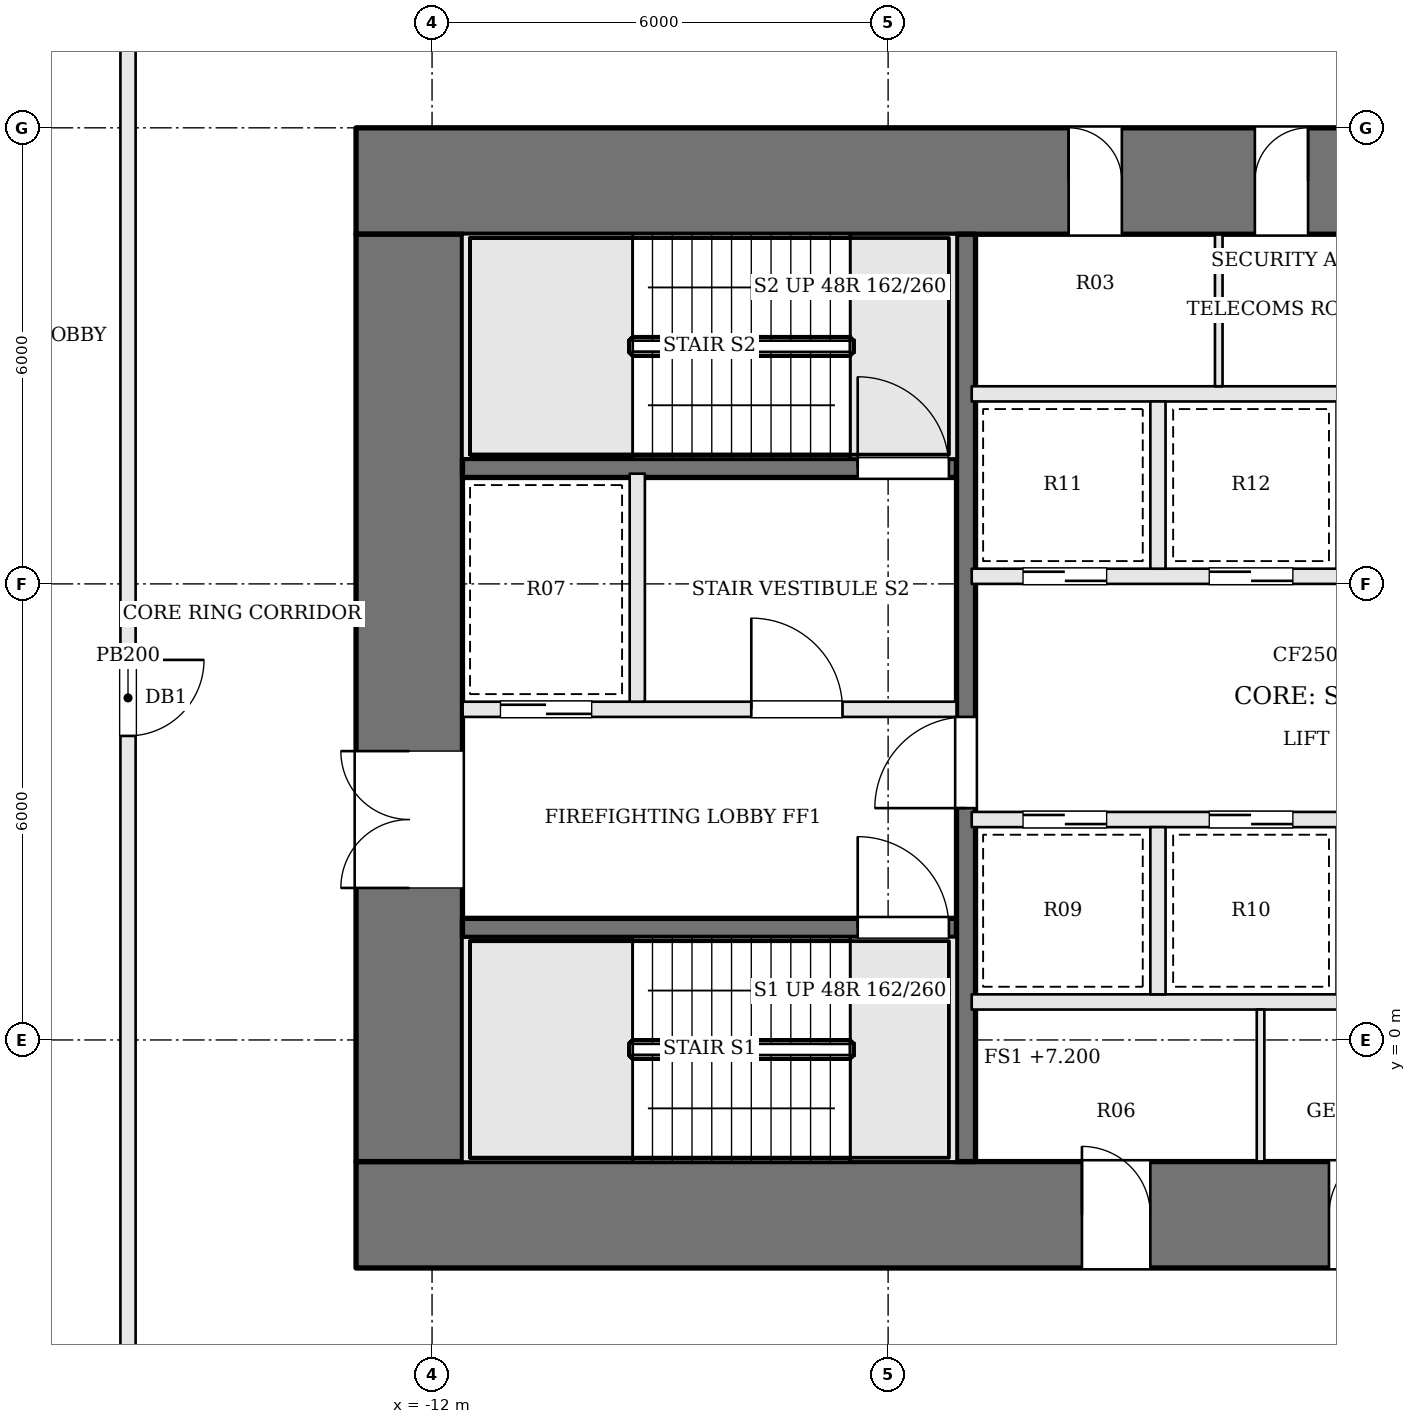
"""IFC4 building model, lengths in metres.
Left out: names, types, materials, properties, quantities, classifications, styles, units other than length and angle.
Written with IfcOpenShell. Run it as: python <this file> out.ifc"""

import sys

from ifc_helpers import new_model, si_unit, direction, frame, frame_2d, origin, place, context, subcontext, project, spatial, rectangle, extrude, element, fill, save


model = new_model("IFC4")
c1 = context("Model", 3, precision=1e-05, world=origin(), true_north=direction((0.0, 1.0)))
c2 = subcontext(c1, "Body", "Model", "MODEL_VIEW")
j1 = project(units=[si_unit("LENGTHUNIT", "METRE"), si_unit("PLANEANGLEUNIT", "RADIAN")], contexts=[c1])
p1 = place(None, origin())
s1 = spatial("IfcSite", under=j1, at=p1, CompositionType="ELEMENT")
p2 = place(p1, origin())
s2 = spatial("IfcBuilding", under=s1, at=p2, CompositionType="ELEMENT")
p3 = place(p2, frame((0.0, 0.0, 7.2)))
s3 = spatial("IfcBuildingStorey", under=s2, at=p3, CompositionType="ELEMENT", Elevation=7.2)
p4 = place(p3, frame((-13.0, 11.3, 0.0), z_axis=(0.0, 0.0, 1.0), x_axis=(1.0, 0.0, 0.0)))
e1 = element("IfcWall", 1, at=p4, inside=s3, PredefinedType="SHEAR", context=c2, shape_type="SweptSolid", body=[
    extrude(rectangle(XDim=26.0, YDim=1.4, at=frame_2d((13.0, 0.0))), origin(), (0.0, 0.0, 1.0), 7.8),
])
p5 = place(p4, frame((9.375, 0.0, 0.0)))
e2 = element("IfcOpeningElement", 2, at=p5, cuts=e1, PredefinedType="OPENING", context=c2, shape_type="SweptSolid", body=[
    extrude(rectangle(XDim=0.7, YDim=2.1, at=frame_2d((0.35, 1.05))), frame((0.0, 0.71, 0.0), z_axis=(0.0, -1.0, 0.0), x_axis=(1.0, 0.0, 0.0)), (0.0, 0.0, 1.0), 1.42),
])
p6 = place(p4, frame((11.825, 0.0, 0.0)))
e3 = element("IfcOpeningElement", 3, at=p6, cuts=e1, PredefinedType="OPENING", context=c2, shape_type="SweptSolid", body=[
    extrude(rectangle(XDim=0.7, YDim=2.1, at=frame_2d((0.35, 1.05))), frame((0.0, 0.71, 0.0), z_axis=(0.0, -1.0, 0.0), x_axis=(1.0, 0.0, 0.0)), (0.0, 0.0, 1.0), 1.42),
])
p7 = place(p4, frame((13.725, 0.0, 0.0)))
e4 = element("IfcOpeningElement", 4, at=p7, cuts=e1, PredefinedType="OPENING", context=c2, shape_type="SweptSolid", body=[
    extrude(rectangle(XDim=1.0, YDim=2.1, at=frame_2d((0.5, 1.05))), frame((0.0, 0.71, 0.0), z_axis=(0.0, -1.0, 0.0), x_axis=(1.0, 0.0, 0.0)), (0.0, 0.0, 1.0), 1.42),
])
p8 = place(p4, frame((16.175, 0.0, 0.0)))
e5 = element("IfcOpeningElement", 5, at=p8, cuts=e1, PredefinedType="OPENING", context=c2, shape_type="SweptSolid", body=[
    extrude(rectangle(XDim=1.0, YDim=2.1, at=frame_2d((0.5, 1.05))), frame((0.0, 0.71, 0.0), z_axis=(0.0, -1.0, 0.0), x_axis=(1.0, 0.0, 0.0)), (0.0, 0.0, 1.0), 1.42),
])
p9 = place(p3, frame((-13.0, -2.3, 0.0), z_axis=(0.0, 0.0, 1.0), x_axis=(1.0, 0.0, 0.0)))
e6 = element("IfcWall", 6, at=p9, inside=s3, PredefinedType="SHEAR", context=c2, shape_type="SweptSolid", body=[
    extrude(rectangle(XDim=26.0, YDim=1.4, at=frame_2d((13.0, 0.0))), origin(), (0.0, 0.0, 1.0), 7.8),
])
p10 = place(p9, frame((9.55, 0.0, 0.0)))
e7 = element("IfcOpeningElement", 7, at=p10, cuts=e6, PredefinedType="OPENING", context=c2, shape_type="SweptSolid", body=[
    extrude(rectangle(XDim=0.9, YDim=2.1, at=frame_2d((0.45, 1.05))), frame((0.0, 0.71, 0.0), z_axis=(0.0, -1.0, 0.0), x_axis=(1.0, 0.0, 0.0)), (0.0, 0.0, 1.0), 1.42),
])
p11 = place(p9, frame((12.8, 0.0, 0.0)))
e8 = element("IfcOpeningElement", 8, at=p11, cuts=e6, PredefinedType="OPENING", context=c2, shape_type="SweptSolid", body=[
    extrude(rectangle(XDim=0.9, YDim=2.1, at=frame_2d((0.45, 1.05))), frame((0.0, 0.71, 0.0), z_axis=(0.0, -1.0, 0.0), x_axis=(1.0, 0.0, 0.0)), (0.0, 0.0, 1.0), 1.42),
])
p12 = place(p9, frame((15.0, 0.0, 0.0)))
e9 = element("IfcOpeningElement", 9, at=p12, cuts=e6, PredefinedType="OPENING", context=c2, shape_type="SweptSolid", body=[
    extrude(rectangle(XDim=1.0, YDim=2.1, at=frame_2d((0.5, 1.05))), frame((0.0, 0.71, 0.0), z_axis=(0.0, -1.0, 0.0), x_axis=(1.0, 0.0, 0.0)), (0.0, 0.0, 1.0), 1.42),
])
p13 = place(p9, frame((16.7, 0.0, 0.0)))
e10 = element("IfcOpeningElement", 10, at=p13, cuts=e6, PredefinedType="OPENING", context=c2, shape_type="SweptSolid", body=[
    extrude(rectangle(XDim=0.9, YDim=2.1, at=frame_2d((0.45, 1.05))), frame((0.0, 0.71, 0.0), z_axis=(0.0, -1.0, 0.0), x_axis=(1.0, 0.0, 0.0)), (0.0, 0.0, 1.0), 1.42),
])
p14 = place(p3, frame((-12.3, -1.6, 0.0), z_axis=(0.0, 0.0, 1.0), x_axis=(0.0, 1.0, 0.0)))
e11 = element("IfcWall", 11, at=p14, inside=s3, PredefinedType="SHEAR", context=c2, shape_type="SweptSolid", body=[
    extrude(rectangle(XDim=12.2, YDim=1.4, at=frame_2d((6.1, 0.0))), origin(), (0.0, 0.0, 1.0), 7.8),
])
p15 = place(p14, frame((3.6, 0.0, 0.0)))
e12 = element("IfcOpeningElement", 12, at=p15, cuts=e11, PredefinedType="OPENING", context=c2, shape_type="SweptSolid", body=[
    extrude(rectangle(XDim=1.8, YDim=2.1, at=frame_2d((0.9, 1.05))), frame((0.0, 0.71, 0.0), z_axis=(0.0, -1.0, 0.0), x_axis=(1.0, 0.0, 0.0)), (0.0, 0.0, 1.0), 1.42),
])
p16 = place(p3, frame((-11.6, 1.475, 0.0), z_axis=(0.0, 0.0, 1.0), x_axis=(1.0, 0.0, 0.0)))
e13 = element("IfcWall", 13, at=p16, inside=s3, PredefinedType="SOLIDWALL", context=c2, shape_type="SweptSolid", body=[
    extrude(rectangle(XDim=6.5, YDim=0.25, at=frame_2d((3.25, 0.0))), origin(), (0.0, 0.0, 1.0), 7.55),
])
p17 = place(p16, frame((5.2, 0.0, 0.0)))
e14 = element("IfcOpeningElement", 14, at=p17, cuts=e13, PredefinedType="OPENING", context=c2, shape_type="SweptSolid", body=[
    extrude(rectangle(XDim=1.2, YDim=2.1, at=frame_2d((0.6, 1.05))), frame((0.0, 0.135, 0.0), z_axis=(0.0, -1.0, 0.0), x_axis=(1.0, 0.0, 0.0)), (0.0, 0.0, 1.0), 0.27),
])
p18 = place(p3, frame((-11.6, 4.35, 0.0), z_axis=(0.0, 0.0, 1.0), x_axis=(1.0, 0.0, 0.0)))
e15 = element("IfcWall", 15, at=p18, inside=s3, PredefinedType="SOLIDWALL", context=c2, shape_type="SweptSolid", body=[
    extrude(rectangle(XDim=6.5, YDim=0.2, at=frame_2d((3.25, 0.0))), origin(), (0.0, 0.0, 1.0), 7.55),
])
p19 = place(p18, frame((3.8, 0.0, 0.0)))
e16 = element("IfcOpeningElement", 16, at=p19, cuts=e15, PredefinedType="OPENING", context=c2, shape_type="SweptSolid", body=[
    extrude(rectangle(XDim=1.2, YDim=2.1, at=frame_2d((0.6, 1.05))), frame((0.0, 0.11, 0.0), z_axis=(0.0, -1.0, 0.0), x_axis=(1.0, 0.0, 0.0)), (0.0, 0.0, 1.0), 0.22),
])
p20 = place(p18, frame((0.5, 0.0, 0.0)))
e17 = element("IfcOpeningElement", 17, at=p20, cuts=e15, PredefinedType="OPENING", context=c2, shape_type="SweptSolid", body=[
    extrude(rectangle(XDim=1.2, YDim=2.1, at=frame_2d((0.6, 1.05))), frame((0.0, 0.11, 0.0), z_axis=(0.0, -1.0, 0.0), x_axis=(1.0, 0.0, 0.0)), (0.0, 0.0, 1.0), 0.22),
])
p21 = place(p3, frame((-11.6, 7.525, 0.0), z_axis=(0.0, 0.0, 1.0), x_axis=(1.0, 0.0, 0.0)))
e18 = element("IfcWall", 18, at=p21, inside=s3, PredefinedType="SOLIDWALL", context=c2, shape_type="SweptSolid", body=[
    extrude(rectangle(XDim=6.5, YDim=0.25, at=frame_2d((3.25, 0.0))), origin(), (0.0, 0.0, 1.0), 7.55),
])
p22 = place(p21, frame((5.2, 0.0, 0.0)))
e19 = element("IfcOpeningElement", 19, at=p22, cuts=e18, PredefinedType="OPENING", context=c2, shape_type="SweptSolid", body=[
    extrude(rectangle(XDim=1.2, YDim=2.1, at=frame_2d((0.6, 1.05))), frame((0.0, 0.135, 0.0), z_axis=(0.0, -1.0, 0.0), x_axis=(1.0, 0.0, 0.0)), (0.0, 0.0, 1.0), 0.27),
])
p23 = place(p3, frame((-9.3, 4.45, 0.0), z_axis=(0.0, 0.0, 1.0), x_axis=(0.0, 1.0, 0.0)))
e20 = element("IfcWall", 20, at=p23, inside=s3, PredefinedType="SOLIDWALL", context=c2, shape_type="SweptSolid", body=[
    extrude(rectangle(XDim=3.0, YDim=0.2, at=frame_2d((1.5, 0.0))), origin(), (0.0, 0.0, 1.0), 7.55),
])
p24 = place(p3, frame((-4.975, -1.6, 0.0), z_axis=(0.0, 0.0, 1.0), x_axis=(0.0, 1.0, 0.0)))
e21 = element("IfcWall", 21, at=p24, inside=s3, PredefinedType="SOLIDWALL", context=c2, shape_type="SweptSolid", body=[
    extrude(rectangle(XDim=12.2, YDim=0.25, at=frame_2d((6.1, 0.0))), origin(), (0.0, 0.0, 1.0), 7.55),
])
p25 = place(p24, frame((4.65, 0.0, 0.0)))
e22 = element("IfcOpeningElement", 22, at=p25, cuts=e21, PredefinedType="OPENING", context=c2, shape_type="SweptSolid", body=[
    extrude(rectangle(XDim=1.2, YDim=2.1, at=frame_2d((0.6, 1.05))), frame((0.0, 0.135, 0.0), z_axis=(0.0, -1.0, 0.0), x_axis=(1.0, 0.0, 0.0)), (0.0, 0.0, 1.0), 0.27),
])
p26 = place(p3, frame((-4.9, 0.5, 0.0), z_axis=(0.0, 0.0, 1.0), x_axis=(1.0, 0.0, 0.0)))
e23 = element("IfcWall", 23, at=p26, inside=s3, PredefinedType="SOLIDWALL", context=c2, shape_type="SweptSolid", body=[
    extrude(rectangle(XDim=9.8, YDim=0.2, at=frame_2d((4.9, 0.0))), origin(), (0.0, 0.0, 1.0), 7.55),
])
p27 = place(p3, frame((-4.9, 2.9, 0.0), z_axis=(0.0, 0.0, 1.0), x_axis=(1.0, 0.0, 0.0)))
e24 = element("IfcWall", 24, at=p27, inside=s3, PredefinedType="SOLIDWALL", context=c2, shape_type="SweptSolid", body=[
    extrude(rectangle(XDim=9.8, YDim=0.2, at=frame_2d((4.9, 0.0))), origin(), (0.0, 0.0, 1.0), 7.55),
])
p28 = place(p27, frame((0.675, 0.0, 0.0)))
e25 = element("IfcOpeningElement", 25, at=p28, cuts=e24, PredefinedType="OPENING", context=c2, shape_type="SweptSolid", body=[
    extrude(rectangle(XDim=1.1, YDim=2.1, at=frame_2d((0.55, 1.05))), frame((0.0, 0.11, 0.0), z_axis=(0.0, -1.0, 0.0), x_axis=(1.0, 0.0, 0.0)), (0.0, 0.0, 1.0), 0.22),
])
p29 = place(p27, frame((3.125, 0.0, 0.0)))
e26 = element("IfcOpeningElement", 26, at=p29, cuts=e24, PredefinedType="OPENING", context=c2, shape_type="SweptSolid", body=[
    extrude(rectangle(XDim=1.1, YDim=2.1, at=frame_2d((0.55, 1.05))), frame((0.0, 0.11, 0.0), z_axis=(0.0, -1.0, 0.0), x_axis=(1.0, 0.0, 0.0)), (0.0, 0.0, 1.0), 0.22),
])
p30 = place(p3, frame((-4.9, 6.1, 0.0), z_axis=(0.0, 0.0, 1.0), x_axis=(1.0, 0.0, 0.0)))
e27 = element("IfcWall", 27, at=p30, inside=s3, PredefinedType="SOLIDWALL", context=c2, shape_type="SweptSolid", body=[
    extrude(rectangle(XDim=9.8, YDim=0.2, at=frame_2d((4.9, 0.0))), origin(), (0.0, 0.0, 1.0), 7.55),
])
p31 = place(p30, frame((0.675, 0.0, 0.0)))
e28 = element("IfcOpeningElement", 28, at=p31, cuts=e27, PredefinedType="OPENING", context=c2, shape_type="SweptSolid", body=[
    extrude(rectangle(XDim=1.1, YDim=2.1, at=frame_2d((0.55, 1.05))), frame((0.0, 0.11, 0.0), z_axis=(0.0, -1.0, 0.0), x_axis=(1.0, 0.0, 0.0)), (0.0, 0.0, 1.0), 0.22),
])
p32 = place(p30, frame((3.125, 0.0, 0.0)))
e29 = element("IfcOpeningElement", 29, at=p32, cuts=e27, PredefinedType="OPENING", context=c2, shape_type="SweptSolid", body=[
    extrude(rectangle(XDim=1.1, YDim=2.1, at=frame_2d((0.55, 1.05))), frame((0.0, 0.11, 0.0), z_axis=(0.0, -1.0, 0.0), x_axis=(1.0, 0.0, 0.0)), (0.0, 0.0, 1.0), 0.22),
])
p33 = place(p30, frame((5.575, 0.0, 0.0)))
e30 = element("IfcOpeningElement", 30, at=p33, cuts=e27, PredefinedType="OPENING", context=c2, shape_type="SweptSolid", body=[
    extrude(rectangle(XDim=1.1, YDim=2.1, at=frame_2d((0.55, 1.05))), frame((0.0, 0.11, 0.0), z_axis=(0.0, -1.0, 0.0), x_axis=(1.0, 0.0, 0.0)), (0.0, 0.0, 1.0), 0.22),
])
p34 = place(p30, frame((8.025, 0.0, 0.0)))
e31 = element("IfcOpeningElement", 31, at=p34, cuts=e27, PredefinedType="OPENING", context=c2, shape_type="SweptSolid", body=[
    extrude(rectangle(XDim=1.1, YDim=2.1, at=frame_2d((0.55, 1.05))), frame((0.0, 0.11, 0.0), z_axis=(0.0, -1.0, 0.0), x_axis=(1.0, 0.0, 0.0)), (0.0, 0.0, 1.0), 0.22),
])
p35 = place(p3, frame((-4.9, 8.5, 0.0), z_axis=(0.0, 0.0, 1.0), x_axis=(1.0, 0.0, 0.0)))
e32 = element("IfcWall", 32, at=p35, inside=s3, PredefinedType="SOLIDWALL", context=c2, shape_type="SweptSolid", body=[
    extrude(rectangle(XDim=9.8, YDim=0.2, at=frame_2d((4.9, 0.0))), origin(), (0.0, 0.0, 1.0), 7.55),
])
for number, where, z_axis, x_axis in (
    (33, (-2.45, 0.6, 0.0), (0.0, 0.0, 1.0), (0.0, 1.0, 0.0)),
    (34, (-2.45, 6.2, 0.0), (0.0, 0.0, 1.0), (0.0, 1.0, 0.0)),
):
    element("IfcWall", number, at=place(p3, frame(where, z_axis=z_axis, x_axis=x_axis)), inside=s3, PredefinedType="SOLIDWALL", context=c2, shape_type="SweptSolid", body=[
        extrude(rectangle(XDim=2.2, YDim=0.2, at=frame_2d((1.1, 0.0))), origin(), (0.0, 0.0, 1.0), 7.55),
    ])
for number, where, z_axis, x_axis in (
    (35, (-1.1, -1.6, 0.0), (0.0, 0.0, 1.0), (0.0, 1.0, 0.0)),
    (36, (-1.65, 8.6, 0.0), (0.0, 0.0, 1.0), (0.0, 1.0, 0.0)),
):
    element("IfcWall", number, at=place(p3, frame(where, z_axis=z_axis, x_axis=x_axis)), inside=s3, PredefinedType="PARTITIONING", context=c2, shape_type="SweptSolid", body=[
        extrude(rectangle(XDim=2.0, YDim=0.1, at=frame_2d((1.0, 0.0))), origin(), (0.0, 0.0, 1.0), 7.55),
    ])
p36 = place(p3, frame((-16.0, 14.9, 0.0), z_axis=(0.0, 0.0, 1.0), x_axis=(0.0, -1.0, 0.0)))
e37 = element("IfcWall", 37, at=p36, inside=s3, PredefinedType="PARTITIONING", context=c2, shape_type="SweptSolid", body=[
    extrude(rectangle(XDim=20.8, YDim=0.2, at=frame_2d((10.4, 0.0))), origin(), (0.0, 0.0, 1.0), 6.83),
])
p37 = place(p36, frame((9.9, 0.0, 0.0)))
e38 = element("IfcOpeningElement", 38, at=p37, cuts=e37, PredefinedType="OPENING", context=c2, shape_type="SweptSolid", body=[
    extrude(rectangle(XDim=1.0, YDim=2.1, at=frame_2d((0.5, 1.05))), frame((0.0, 0.11, 0.0), z_axis=(0.0, -1.0, 0.0), x_axis=(1.0, 0.0, 0.0)), (0.0, 0.0, 1.0), 0.22),
])
p38 = place(p15, origin())
e39 = element("IfcDoor", 39, at=p38, inside=s3, OperationType="DOUBLE_DOOR_SINGLE_SWING", PredefinedType="DOOR", context=c2, shape_type="SweptSolid", body=[
    extrude(rectangle(XDim=1.8, YDim=2.1, at=frame_2d((0.9, 1.05))), frame((0.0, 0.025, 0.0), z_axis=(0.0, -1.0, 0.0), x_axis=(1.0, 0.0, 0.0)), (0.0, 0.0, 1.0), 0.05),
])
fill(e12, e39)
p39 = place(p25, origin())
e40 = element("IfcDoor", 40, at=p39, inside=s3, OperationType="SINGLE_SWING_LEFT", PredefinedType="DOOR", context=c2, shape_type="SweptSolid", body=[
    extrude(rectangle(XDim=1.2, YDim=2.1, at=frame_2d((0.6, 1.05))), frame((0.0, 0.025, 0.0), z_axis=(0.0, -1.0, 0.0), x_axis=(1.0, 0.0, 0.0)), (0.0, 0.0, 1.0), 0.05),
])
fill(e22, e40)
p40 = place(p19, origin())
e41 = element("IfcDoor", 41, at=p40, inside=s3, OperationType="SINGLE_SWING_LEFT", PredefinedType="DOOR", context=c2, shape_type="SweptSolid", body=[
    extrude(rectangle(XDim=1.2, YDim=2.1, at=frame_2d((0.6, 1.05))), frame((0.0, 0.025, 0.0), z_axis=(0.0, -1.0, 0.0), x_axis=(1.0, 0.0, 0.0)), (0.0, 0.0, 1.0), 0.05),
])
fill(e16, e41)
p41 = place(p17, origin())
e42 = element("IfcDoor", 42, at=p41, inside=s3, OperationType="SINGLE_SWING_LEFT", PredefinedType="DOOR", context=c2, shape_type="SweptSolid", body=[
    extrude(rectangle(XDim=1.2, YDim=2.1, at=frame_2d((0.6, 1.05))), frame((0.0, 0.025, 0.0), z_axis=(0.0, -1.0, 0.0), x_axis=(1.0, 0.0, 0.0)), (0.0, 0.0, 1.0), 0.05),
])
fill(e14, e42)
p42 = place(p22, origin())
e43 = element("IfcDoor", 43, at=p42, inside=s3, OperationType="SINGLE_SWING_LEFT", PredefinedType="DOOR", context=c2, shape_type="SweptSolid", body=[
    extrude(rectangle(XDim=1.2, YDim=2.1, at=frame_2d((0.6, 1.05))), frame((0.0, 0.025, 0.0), z_axis=(0.0, -1.0, 0.0), x_axis=(1.0, 0.0, 0.0)), (0.0, 0.0, 1.0), 0.05),
])
fill(e19, e43)
p43 = place(p20, origin())
e44 = element("IfcDoor", 44, at=p43, inside=s3, OperationType="SLIDING_TO_RIGHT", PredefinedType="DOOR", context=c2, shape_type="SweptSolid", body=[
    extrude(rectangle(XDim=1.2, YDim=2.1, at=frame_2d((0.6, 1.05))), frame((0.0, 0.025, 0.0), z_axis=(0.0, -1.0, 0.0), x_axis=(1.0, 0.0, 0.0)), (0.0, 0.0, 1.0), 0.05),
])
fill(e17, e44)
p44 = place(p28, origin())
e45 = element("IfcDoor", 45, at=p44, inside=s3, OperationType="SLIDING_TO_RIGHT", PredefinedType="DOOR", context=c2, shape_type="SweptSolid", body=[
    extrude(rectangle(XDim=1.1, YDim=2.1, at=frame_2d((0.55, 1.05))), frame((0.0, 0.025, 0.0), z_axis=(0.0, -1.0, 0.0), x_axis=(1.0, 0.0, 0.0)), (0.0, 0.0, 1.0), 0.05),
])
fill(e25, e45)
p45 = place(p29, origin())
e46 = element("IfcDoor", 46, at=p45, inside=s3, OperationType="SLIDING_TO_LEFT", PredefinedType="DOOR", context=c2, shape_type="SweptSolid", body=[
    extrude(rectangle(XDim=1.1, YDim=2.1, at=frame_2d((0.55, 1.05))), frame((0.0, 0.025, 0.0), z_axis=(0.0, -1.0, 0.0), x_axis=(1.0, 0.0, 0.0)), (0.0, 0.0, 1.0), 0.05),
])
fill(e26, e46)
p46 = place(p31, origin())
e47 = element("IfcDoor", 47, at=p46, inside=s3, OperationType="SLIDING_TO_RIGHT", PredefinedType="DOOR", context=c2, shape_type="SweptSolid", body=[
    extrude(rectangle(XDim=1.1, YDim=2.1, at=frame_2d((0.55, 1.05))), frame((0.0, 0.025, 0.0), z_axis=(0.0, -1.0, 0.0), x_axis=(1.0, 0.0, 0.0)), (0.0, 0.0, 1.0), 0.05),
])
fill(e28, e47)
p47 = place(p32, origin())
e48 = element("IfcDoor", 48, at=p47, inside=s3, OperationType="SLIDING_TO_LEFT", PredefinedType="DOOR", context=c2, shape_type="SweptSolid", body=[
    extrude(rectangle(XDim=1.1, YDim=2.1, at=frame_2d((0.55, 1.05))), frame((0.0, 0.025, 0.0), z_axis=(0.0, -1.0, 0.0), x_axis=(1.0, 0.0, 0.0)), (0.0, 0.0, 1.0), 0.05),
])
fill(e29, e48)
p48 = place(p10, origin())
e49 = element("IfcDoor", 49, at=p48, inside=s3, OperationType="SINGLE_SWING_LEFT", PredefinedType="DOOR", context=c2, shape_type="SweptSolid", body=[
    extrude(rectangle(XDim=0.9, YDim=2.1, at=frame_2d((0.45, 1.05))), frame((0.0, 0.025, 0.0), z_axis=(0.0, -1.0, 0.0), x_axis=(1.0, 0.0, 0.0)), (0.0, 0.0, 1.0), 0.05),
])
fill(e7, e49)
p49 = place(p11, origin())
e50 = element("IfcDoor", 50, at=p49, inside=s3, OperationType="SINGLE_SWING_RIGHT", PredefinedType="DOOR", context=c2, shape_type="SweptSolid", body=[
    extrude(rectangle(XDim=0.9, YDim=2.1, at=frame_2d((0.45, 1.05))), frame((0.0, 0.025, 0.0), z_axis=(0.0, -1.0, 0.0), x_axis=(1.0, 0.0, 0.0)), (0.0, 0.0, 1.0), 0.05),
])
fill(e8, e50)
p50 = place(p5, origin())
e51 = element("IfcDoor", 51, at=p50, inside=s3, OperationType="SINGLE_SWING_LEFT", PredefinedType="DOOR", context=c2, shape_type="SweptSolid", body=[
    extrude(rectangle(XDim=0.7, YDim=2.1, at=frame_2d((0.35, 1.05))), frame((0.0, 0.025, 0.0), z_axis=(0.0, -1.0, 0.0), x_axis=(1.0, 0.0, 0.0)), (0.0, 0.0, 1.0), 0.05),
])
fill(e2, e51)
p51 = place(p6, origin())
e52 = element("IfcDoor", 52, at=p51, inside=s3, OperationType="SINGLE_SWING_RIGHT", PredefinedType="DOOR", context=c2, shape_type="SweptSolid", body=[
    extrude(rectangle(XDim=0.7, YDim=2.1, at=frame_2d((0.35, 1.05))), frame((0.0, 0.025, 0.0), z_axis=(0.0, -1.0, 0.0), x_axis=(1.0, 0.0, 0.0)), (0.0, 0.0, 1.0), 0.05),
])
fill(e3, e52)
p52 = place(p37, origin())
e53 = element("IfcDoor", 53, at=p52, inside=s3, OperationType="SINGLE_SWING_LEFT", PredefinedType="DOOR", context=c2, shape_type="SweptSolid", body=[
    extrude(rectangle(XDim=1.0, YDim=2.1, at=frame_2d((0.5, 1.05))), frame((0.0, 0.025, 0.0), z_axis=(0.0, -1.0, 0.0), x_axis=(1.0, 0.0, 0.0)), (0.0, 0.0, 1.0), 0.05),
])
fill(e38, e53)
save(model, sys.argv[1])
